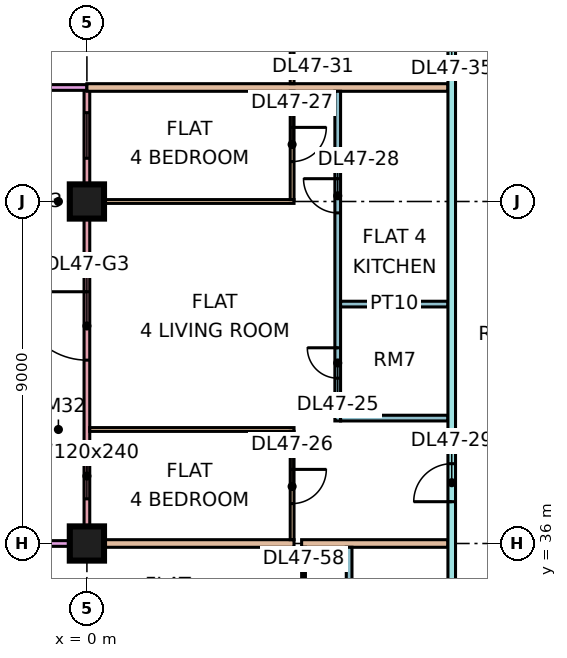
"""IFC4 building model, lengths in metres.
Left out: names, types, materials, properties, quantities, classifications, styles, units other than length and angle.
Written with IfcOpenShell. Run it as: python <this file> out.ifc"""

import sys

from ifc_helpers import new_model, si_unit, direction, frame, frame_2d, origin, origin_2d, place, context, subcontext, project, spatial, rectangle, extrude, element, fill, save


model = new_model("IFC4")
c1 = context("Model", 3, precision=1e-05, world=origin(), true_north=direction((0.0, 1.0)))
c2 = subcontext(c1, "Body", "Model", "MODEL_VIEW")
j1 = project(units=[si_unit("LENGTHUNIT", "METRE"), si_unit("PLANEANGLEUNIT", "RADIAN")], contexts=[c1])
p1 = place(None, origin())
s1 = spatial("IfcSite", under=j1, at=p1, CompositionType="ELEMENT")
p2 = place(p1, origin())
s2 = spatial("IfcBuilding", under=s1, at=p2, CompositionType="ELEMENT")
p3 = place(p2, frame((0.0, 0.0, 202.4)))
s3 = spatial("IfcBuildingStorey", under=s2, at=p3, CompositionType="ELEMENT", Elevation=202.4)
p4 = place(p3, frame((0.0, 36.0, 0.0), z_axis=(0.0, 0.0, 1.0), x_axis=(1.0, 0.0, 0.0)))
e1 = element("IfcColumn", 1, at=p4, inside=s3, PredefinedType="COLUMN", context=c2, shape_type="SweptSolid", body=[
    extrude(rectangle(XDim=0.9, YDim=0.9, at=origin_2d()), origin(), (0.0, 0.0, 1.0), 3.75),
])
p5 = place(p3, frame((0.0, 45.0, 0.0), z_axis=(0.0, 0.0, 1.0), x_axis=(1.0, 0.0, 0.0)))
e2 = element("IfcColumn", 2, at=p5, inside=s3, PredefinedType="COLUMN", context=c2, shape_type="SweptSolid", body=[
    extrude(rectangle(XDim=0.9, YDim=0.9, at=origin_2d()), origin(), (0.0, 0.0, 1.0), 3.75),
])
p6 = place(p3, frame((0.0, 47.925, 0.0), z_axis=(0.0, 0.0, 1.0), x_axis=(0.0, -1.0, 0.0)))
e3 = element("IfcWall", 3, at=p6, inside=s3, PredefinedType="SOLIDWALL", context=c2, shape_type="SweptSolid", body=[
    extrude(rectangle(XDim=11.85, YDim=0.15, at=frame_2d((5.925, 0.0))), origin(), (0.0, 0.0, 1.0), 3.3),
])
p7 = place(p6, frame((0.587, 0.0, 0.45)))
e4 = element("IfcOpeningElement", 4, at=p7, cuts=e3, PredefinedType="OPENING", context=c2, shape_type="SweptSolid", body=[
    extrude(rectangle(XDim=1.2, YDim=2.4, at=frame_2d((0.6, 1.2))), frame((0.0, 0.085, 0.0), z_axis=(0.0, -1.0, 0.0), x_axis=(1.0, 0.0, 0.0)), (0.0, 0.0, 1.0), 0.17),
])
p8 = place(p6, frame((5.3, 0.0, 0.0)))
e5 = element("IfcOpeningElement", 5, at=p8, cuts=e3, PredefinedType="OPENING", context=c2, shape_type="SweptSolid", body=[
    extrude(rectangle(XDim=1.8, YDim=2.4, at=frame_2d((0.9, 1.2))), frame((0.0, 0.085, 0.0), z_axis=(0.0, -1.0, 0.0), x_axis=(1.0, 0.0, 0.0)), (0.0, 0.0, 1.0), 0.17),
])
p9 = place(p6, frame((9.55, 0.0, 0.45)))
e6 = element("IfcOpeningElement", 6, at=p9, cuts=e3, PredefinedType="OPENING", context=c2, shape_type="SweptSolid", body=[
    extrude(rectangle(XDim=1.2, YDim=2.4, at=frame_2d((0.6, 1.2))), frame((0.0, 0.085, 0.0), z_axis=(0.0, -1.0, 0.0), x_axis=(1.0, 0.0, 0.0)), (0.0, 0.0, 1.0), 0.17),
])
for number, where, z_axis, x_axis in (
    (7, (-1.5, 48.0, 0.0), (0.0, 0.0, 1.0), (1.0, 0.0, 0.0)),
    (8, (-1.5, 36.0, 0.0), (0.0, 0.0, 1.0), (1.0, 0.0, 0.0)),
):
    element("IfcWall", number, at=place(p3, frame(where, z_axis=z_axis, x_axis=x_axis)), inside=s3, PredefinedType="SOLIDWALL", context=c2, shape_type="SweptSolid", body=[
        extrude(rectangle(XDim=1.5, YDim=0.15, at=frame_2d((0.75, 0.0))), origin(), (0.0, 0.0, 1.0), 3.3),
    ])
e9 = element("IfcWall", 9, at=p4, inside=s3, PredefinedType="PARTITIONING", context=c2, shape_type="SweptSolid", body=[
    extrude(rectangle(XDim=5.45, YDim=0.2, at=frame_2d((2.725, 0.0))), origin(), (0.0, 0.0, 1.0), 3.3),
])
p10 = place(p3, frame((0.0, 48.0, 0.0), z_axis=(0.0, 0.0, 1.0), x_axis=(1.0, 0.0, 0.0)))
e10 = element("IfcWall", 10, at=p10, inside=s3, PredefinedType="PARTITIONING", context=c2, shape_type="SweptSolid", body=[
    extrude(rectangle(XDim=9.5, YDim=0.2, at=frame_2d((4.75, 0.0))), origin(), (0.0, 0.0, 1.0), 3.3),
])
for number, where, z_axis, x_axis in (
    (11, (0.074, 39.0, 0.0), (0.0, 0.0, 1.0), (1.0, 0.0, 0.0)),
    (12, (0.074, 45.0, 0.0), (0.0, 0.0, 1.0), (1.0, 0.0, 0.0)),
):
    element("IfcWall", number, at=place(p3, frame(where, z_axis=z_axis, x_axis=x_axis)), inside=s3, PredefinedType="PARTITIONING", context=c2, shape_type="SweptSolid", body=[
        extrude(rectangle(XDim=5.376, YDim=0.1, at=frame_2d((2.688, 0.0))), origin(), (0.0, 0.0, 1.0), 3.3),
    ])
p11 = place(p3, frame((5.4, 36.1, 0.0), z_axis=(0.0, 0.0, 1.0), x_axis=(0.0, 1.0, 0.0)))
e13 = element("IfcWall", 13, at=p11, inside=s3, PredefinedType="PARTITIONING", context=c2, shape_type="SweptSolid", body=[
    extrude(rectangle(XDim=2.85, YDim=0.1, at=frame_2d((1.425, 0.0))), origin(), (0.0, 0.0, 1.0), 3.3),
])
p12 = place(p11, frame((0.95, 0.0, 0.0)))
e14 = element("IfcOpeningElement", 14, at=p12, cuts=e13, PredefinedType="OPENING", context=c2, shape_type="SweptSolid", body=[
    extrude(rectangle(XDim=0.9, YDim=2.1, at=frame_2d((0.45, 1.05))), frame((0.0, 0.06, 0.0), z_axis=(0.0, -1.0, 0.0), x_axis=(1.0, 0.0, 0.0)), (0.0, 0.0, 1.0), 0.12),
])
p13 = place(p3, frame((5.4, 45.05, 0.0), z_axis=(0.0, 0.0, 1.0), x_axis=(0.0, 1.0, 0.0)))
e15 = element("IfcWall", 15, at=p13, inside=s3, PredefinedType="PARTITIONING", context=c2, shape_type="SweptSolid", body=[
    extrude(rectangle(XDim=2.85, YDim=0.1, at=frame_2d((1.425, 0.0))), origin(), (0.0, 0.0, 1.0), 3.3),
])
p14 = place(p13, frame((1.0, 0.0, 0.0)))
e16 = element("IfcOpeningElement", 16, at=p14, cuts=e15, PredefinedType="OPENING", context=c2, shape_type="SweptSolid", body=[
    extrude(rectangle(XDim=0.9, YDim=2.1, at=frame_2d((0.45, 1.05))), frame((0.0, 0.06, 0.0), z_axis=(0.0, -1.0, 0.0), x_axis=(1.0, 0.0, 0.0)), (0.0, 0.0, 1.0), 0.12),
])
p15 = place(p3, frame((5.4, 48.1, 0.0), z_axis=(0.0, 0.0, 1.0), x_axis=(0.0, 1.0, 0.0)))
e17 = element("IfcWall", 17, at=p15, inside=s3, PredefinedType="PARTITIONING", context=c2, shape_type="SweptSolid", body=[
    extrude(rectangle(XDim=2.85, YDim=0.1, at=frame_2d((1.425, 0.0))), origin(), (0.0, 0.0, 1.0), 3.3),
])
p16 = place(p15, frame((0.95, 0.0, 0.0)))
e18 = element("IfcOpeningElement", 18, at=p16, cuts=e17, PredefinedType="OPENING", context=c2, shape_type="SweptSolid", body=[
    extrude(rectangle(XDim=0.9, YDim=2.1, at=frame_2d((0.45, 1.05))), frame((0.0, 0.06, 0.0), z_axis=(0.0, -1.0, 0.0), x_axis=(1.0, 0.0, 0.0)), (0.0, 0.0, 1.0), 0.12),
])
p17 = place(p3, frame((5.65, 36.0, 0.0), z_axis=(0.0, 0.0, 1.0), x_axis=(1.0, 0.0, 0.0)))
e19 = element("IfcWall", 19, at=p17, inside=s3, PredefinedType="PARTITIONING", context=c2, shape_type="SweptSolid", body=[
    extrude(rectangle(XDim=3.85, YDim=0.2, at=frame_2d((1.925, 0.0))), origin(), (0.0, 0.0, 1.0), 3.3),
])
p18 = place(p3, frame((5.7, 33.05, 0.0), z_axis=(0.0, 0.0, 1.0), x_axis=(0.0, 1.0, 0.0)))
e20 = element("IfcWall", 20, at=p18, inside=s3, PredefinedType="PARTITIONING", context=c2, shape_type="SweptSolid", body=[
    extrude(rectangle(XDim=2.85, YDim=0.1, at=frame_2d((1.425, 0.0))), origin(), (0.0, 0.0, 1.0), 3.3),
])
p19 = place(p18, frame((1.0, 0.0, 0.0)))
e21 = element("IfcOpeningElement", 21, at=p19, cuts=e20, PredefinedType="OPENING", context=c2, shape_type="SweptSolid", body=[
    extrude(rectangle(XDim=0.9, YDim=2.1, at=frame_2d((0.45, 1.05))), frame((0.0, 0.06, 0.0), z_axis=(0.0, -1.0, 0.0), x_axis=(1.0, 0.0, 0.0)), (0.0, 0.0, 1.0), 0.12),
])
p20 = place(p3, frame((6.6, 39.225, 0.0), z_axis=(0.0, 0.0, 1.0), x_axis=(0.0, 1.0, 0.0)))
e22 = element("IfcWall", 22, at=p20, inside=s3, PredefinedType="PARTITIONING", context=c2, shape_type="SweptSolid", body=[
    extrude(rectangle(XDim=8.675, YDim=0.15, at=frame_2d((4.337, 0.0))), origin(), (0.0, 0.0, 1.0), 3.3),
])
p21 = place(p20, frame((1.125, 0.0, 0.0)))
e23 = element("IfcOpeningElement", 23, at=p21, cuts=e22, PredefinedType="OPENING", context=c2, shape_type="SweptSolid", body=[
    extrude(rectangle(XDim=0.8, YDim=2.1, at=frame_2d((0.4, 1.05))), frame((0.0, 0.085, 0.0), z_axis=(0.0, -1.0, 0.0), x_axis=(1.0, 0.0, 0.0)), (0.0, 0.0, 1.0), 0.17),
])
p22 = place(p20, frame((5.475, 0.0, 0.0)))
e24 = element("IfcOpeningElement", 24, at=p22, cuts=e22, PredefinedType="OPENING", context=c2, shape_type="SweptSolid", body=[
    extrude(rectangle(XDim=0.9, YDim=2.1, at=frame_2d((0.45, 1.05))), frame((0.0, 0.085, 0.0), z_axis=(0.0, -1.0, 0.0), x_axis=(1.0, 0.0, 0.0)), (0.0, 0.0, 1.0), 0.17),
])
for number, where, z_axis, x_axis in (
    (25, (6.675, 39.3, 0.0), (0.0, 0.0, 1.0), (1.0, 0.0, 0.0)),
    (26, (6.675, 42.3, 0.0), (0.0, 0.0, 1.0), (1.0, 0.0, 0.0)),
):
    element("IfcWall", number, at=place(p3, frame(where, z_axis=z_axis, x_axis=x_axis)), inside=s3, PredefinedType="PARTITIONING", context=c2, shape_type="SweptSolid", body=[
        extrude(rectangle(XDim=2.825, YDim=0.15, at=frame_2d((1.413, 0.0))), origin(), (0.0, 0.0, 1.0), 3.3),
    ])
p23 = place(p3, frame((6.9, 27.225, 0.0), z_axis=(0.0, 0.0, 1.0), x_axis=(0.0, 1.0, 0.0)))
e27 = element("IfcWall", 27, at=p23, inside=s3, PredefinedType="PARTITIONING", context=c2, shape_type="SweptSolid", body=[
    extrude(rectangle(XDim=8.675, YDim=0.15, at=frame_2d((4.337, 0.0))), origin(), (0.0, 0.0, 1.0), 3.3),
])
p24 = place(p23, frame((1.125, 0.0, 0.0)))
e28 = element("IfcOpeningElement", 28, at=p24, cuts=e27, PredefinedType="OPENING", context=c2, shape_type="SweptSolid", body=[
    extrude(rectangle(XDim=0.8, YDim=2.1, at=frame_2d((0.4, 1.05))), frame((0.0, 0.085, 0.0), z_axis=(0.0, -1.0, 0.0), x_axis=(1.0, 0.0, 0.0)), (0.0, 0.0, 1.0), 0.17),
])
p25 = place(p23, frame((5.475, 0.0, 0.0)))
e29 = element("IfcOpeningElement", 29, at=p25, cuts=e27, PredefinedType="OPENING", context=c2, shape_type="SweptSolid", body=[
    extrude(rectangle(XDim=0.9, YDim=2.1, at=frame_2d((0.45, 1.05))), frame((0.0, 0.085, 0.0), z_axis=(0.0, -1.0, 0.0), x_axis=(1.0, 0.0, 0.0)), (0.0, 0.0, 1.0), 0.17),
])
p26 = place(p3, frame((9.6, 20.0, 0.0), z_axis=(0.0, 0.0, 1.0), x_axis=(0.0, 1.0, 0.0)))
e30 = element("IfcWall", 30, at=p26, inside=s3, PredefinedType="PARTITIONING", context=c2, shape_type="SweptSolid", body=[
    extrude(rectangle(XDim=44.35, YDim=0.2, at=frame_2d((22.175, 0.0))), origin(), (0.0, 0.0, 1.0), 3.3),
])
p27 = place(p26, frame((17.1, 0.0, 0.0)))
e31 = element("IfcOpeningElement", 31, at=p27, cuts=e30, PredefinedType="OPENING", context=c2, shape_type="SweptSolid", body=[
    extrude(rectangle(XDim=1.0, YDim=2.1, at=frame_2d((0.5, 1.05))), frame((0.0, 0.11, 0.0), z_axis=(0.0, -1.0, 0.0), x_axis=(1.0, 0.0, 0.0)), (0.0, 0.0, 1.0), 0.22),
])
p28 = place(p26, frame((29.1, 0.0, 0.0)))
e32 = element("IfcOpeningElement", 32, at=p28, cuts=e30, PredefinedType="OPENING", context=c2, shape_type="SweptSolid", body=[
    extrude(rectangle(XDim=1.0, YDim=2.1, at=frame_2d((0.5, 1.05))), frame((0.0, 0.11, 0.0), z_axis=(0.0, -1.0, 0.0), x_axis=(1.0, 0.0, 0.0)), (0.0, 0.0, 1.0), 0.22),
])
p29 = place(p26, frame((0.6, 0.0, 0.0)))
e33 = element("IfcOpeningElement", 33, at=p29, cuts=e30, PredefinedType="OPENING", context=c2, shape_type="SweptSolid", body=[
    extrude(rectangle(XDim=1.2, YDim=2.1, at=frame_2d((0.6, 1.05))), frame((0.0, 0.11, 0.0), z_axis=(0.0, -1.0, 0.0), x_axis=(1.0, 0.0, 0.0)), (0.0, 0.0, 1.0), 0.22),
])
p30 = place(p26, frame((4.35, 0.0, 0.0)))
e34 = element("IfcOpeningElement", 34, at=p30, cuts=e30, PredefinedType="OPENING", context=c2, shape_type="SweptSolid", body=[
    extrude(rectangle(XDim=1.0, YDim=2.1, at=frame_2d((0.5, 1.05))), frame((0.0, 0.11, 0.0), z_axis=(0.0, -1.0, 0.0), x_axis=(1.0, 0.0, 0.0)), (0.0, 0.0, 1.0), 0.22),
])
p31 = place(p7, origin())
e35 = element("IfcWindow", 35, at=p31, inside=s3, PartitioningType="SINGLE_PANEL", PredefinedType="WINDOW", context=c2, shape_type="SweptSolid", body=[
    extrude(rectangle(XDim=1.2, YDim=2.4, at=frame_2d((0.6, 1.2))), frame((0.0, 0.03, 0.0), z_axis=(0.0, -1.0, 0.0), x_axis=(1.0, 0.0, 0.0)), (0.0, 0.0, 1.0), 0.06),
])
fill(e4, e35)
p32 = place(p8, frame((1.8, 0.0, 0.0), z_axis=(0.0, 0.0, 1.0), x_axis=(-1.0, 0.0, 0.0)))
e36 = element("IfcDoor", 36, at=p32, inside=s3, OperationType="DOUBLE_DOOR_SINGLE_SWING", PredefinedType="DOOR", context=c2, shape_type="SweptSolid", body=[
    extrude(rectangle(XDim=1.8, YDim=2.4, at=frame_2d((0.9, 1.2))), frame((0.0, 0.025, 0.0), z_axis=(0.0, -1.0, 0.0), x_axis=(1.0, 0.0, 0.0)), (0.0, 0.0, 1.0), 0.05),
])
fill(e5, e36)
p33 = place(p9, origin())
e37 = element("IfcWindow", 37, at=p33, inside=s3, PartitioningType="SINGLE_PANEL", PredefinedType="WINDOW", context=c2, shape_type="SweptSolid", body=[
    extrude(rectangle(XDim=1.2, YDim=2.4, at=frame_2d((0.6, 1.2))), frame((0.0, 0.03, 0.0), z_axis=(0.0, -1.0, 0.0), x_axis=(1.0, 0.0, 0.0)), (0.0, 0.0, 1.0), 0.06),
])
fill(e6, e37)
p34 = place(p21, frame((0.8, 0.0, 0.0), z_axis=(0.0, 0.0, 1.0), x_axis=(-1.0, 0.0, 0.0)))
e38 = element("IfcDoor", 38, at=p34, inside=s3, OperationType="SINGLE_SWING_RIGHT", PredefinedType="DOOR", context=c2, shape_type="SweptSolid", body=[
    extrude(rectangle(XDim=0.8, YDim=2.1, at=frame_2d((0.4, 1.05))), frame((0.0, 0.025, 0.0), z_axis=(0.0, -1.0, 0.0), x_axis=(1.0, 0.0, 0.0)), (0.0, 0.0, 1.0), 0.05),
])
fill(e23, e38)
p35 = place(p12, origin())
e39 = element("IfcDoor", 39, at=p35, inside=s3, OperationType="SINGLE_SWING_RIGHT", PredefinedType="DOOR", context=c2, shape_type="SweptSolid", body=[
    extrude(rectangle(XDim=0.9, YDim=2.1, at=frame_2d((0.45, 1.05))), frame((0.0, 0.025, 0.0), z_axis=(0.0, -1.0, 0.0), x_axis=(1.0, 0.0, 0.0)), (0.0, 0.0, 1.0), 0.05),
])
fill(e14, e39)
p36 = place(p14, origin())
e40 = element("IfcDoor", 40, at=p36, inside=s3, OperationType="SINGLE_SWING_RIGHT", PredefinedType="DOOR", context=c2, shape_type="SweptSolid", body=[
    extrude(rectangle(XDim=0.9, YDim=2.1, at=frame_2d((0.45, 1.05))), frame((0.0, 0.025, 0.0), z_axis=(0.0, -1.0, 0.0), x_axis=(1.0, 0.0, 0.0)), (0.0, 0.0, 1.0), 0.05),
])
fill(e16, e40)
p37 = place(p22, frame((0.9, 0.0, 0.0), z_axis=(0.0, 0.0, 1.0), x_axis=(-1.0, 0.0, 0.0)))
e41 = element("IfcDoor", 41, at=p37, inside=s3, OperationType="SINGLE_SWING_RIGHT", PredefinedType="DOOR", context=c2, shape_type="SweptSolid", body=[
    extrude(rectangle(XDim=0.9, YDim=2.1, at=frame_2d((0.45, 1.05))), frame((0.0, 0.025, 0.0), z_axis=(0.0, -1.0, 0.0), x_axis=(1.0, 0.0, 0.0)), (0.0, 0.0, 1.0), 0.05),
])
fill(e24, e41)
p38 = place(p27, origin())
e42 = element("IfcDoor", 42, at=p38, inside=s3, OperationType="SINGLE_SWING_LEFT", PredefinedType="DOOR", context=c2, shape_type="SweptSolid", body=[
    extrude(rectangle(XDim=1.0, YDim=2.1, at=frame_2d((0.5, 1.05))), frame((0.0, 0.025, 0.0), z_axis=(0.0, -1.0, 0.0), x_axis=(1.0, 0.0, 0.0)), (0.0, 0.0, 1.0), 0.05),
])
fill(e31, e42)
save(model, sys.argv[1])
